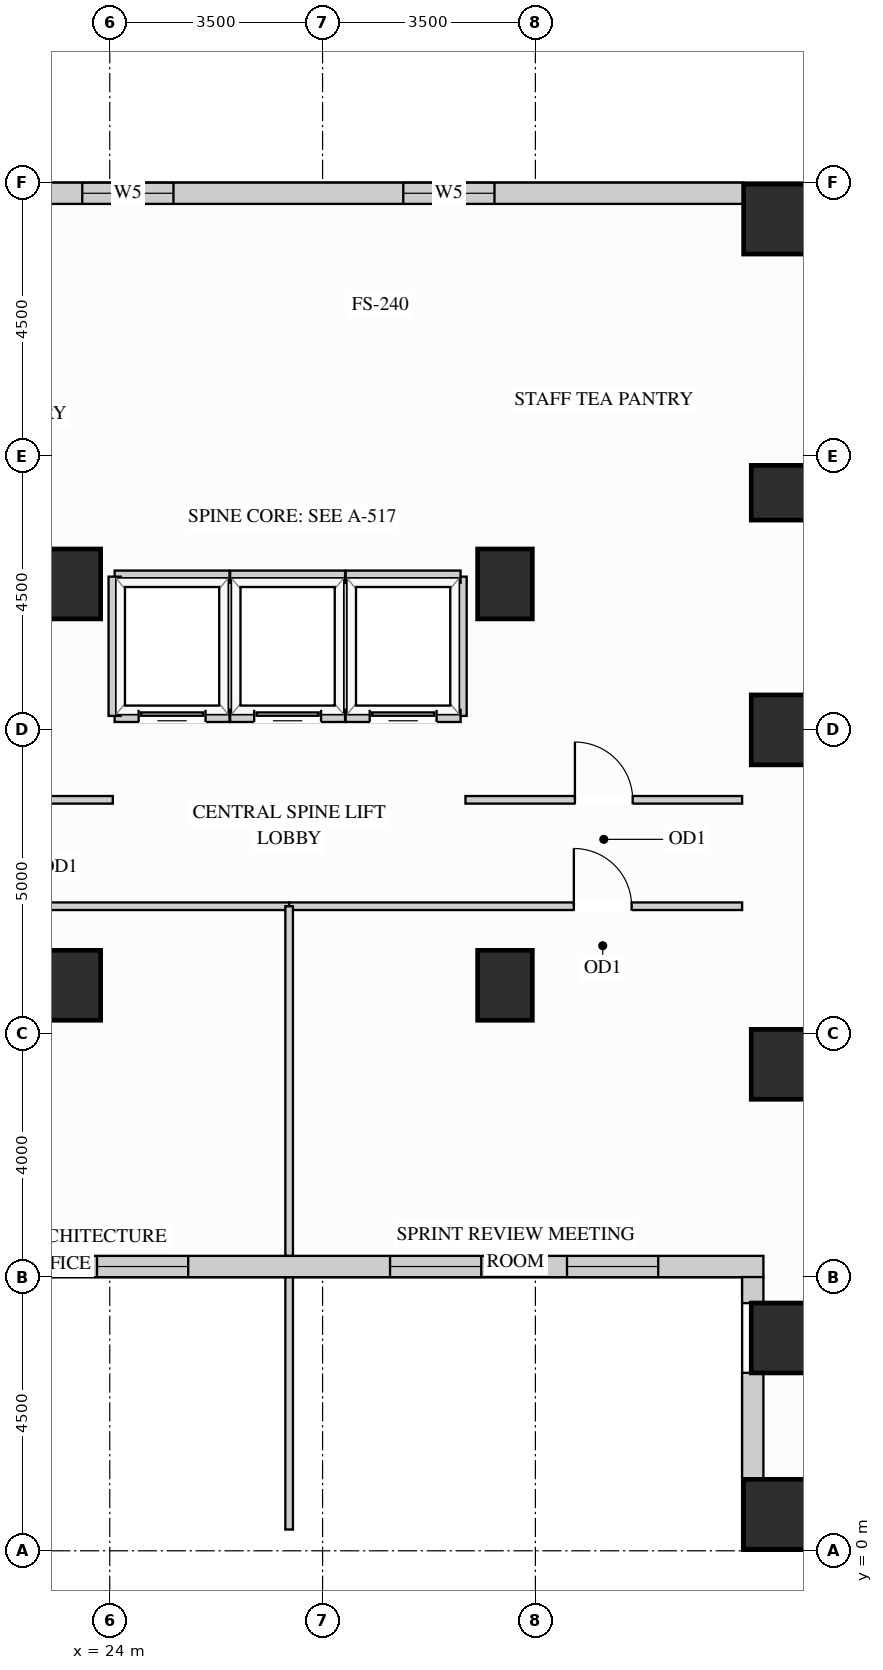
"""IFC4 building model, lengths in metres.
Left out: names, types, materials, properties, quantities, classifications, styles, units other than length and angle.
Written with IfcOpenShell. Run it as: python <this file> out.ifc"""

import sys

from ifc_helpers import new_model, si_unit, direction, frame, frame_2d, origin, origin_2d, place, context, subcontext, project, spatial, rectangle, extrude, source, transform, mapped, element, fill, save


model = new_model("IFC4")
c1 = context("Model", 3, precision=1e-05, world=origin(), true_north=direction((0.0, 1.0)))
c2 = subcontext(c1, "Body", "Model", "MODEL_VIEW")
j1 = project(units=[si_unit("LENGTHUNIT", "METRE"), si_unit("PLANEANGLEUNIT", "RADIAN")], contexts=[c1])
p1 = place(None, origin())
s1 = spatial("IfcSite", under=j1, at=p1, CompositionType="ELEMENT")
p2 = place(p1, origin())
s2 = spatial("IfcBuilding", under=s1, at=p2, CompositionType="ELEMENT")
p3 = place(p2, frame((0.0, 0.0, 77.4)))
s3 = spatial("IfcBuildingStorey", under=s2, at=p3, CompositionType="ELEMENT", Elevation=77.4)
m1 = source(origin(), c2, "Body", "SweptSolid", [
    extrude(rectangle(XDim=0.9, YDim=0.9, at=origin_2d()), origin(), (0.0, 0.0, 1.0), 3.38),
])
p4 = place(p3, frame((35.0, 17.4, 0.0), z_axis=(0.0, 0.0, 1.0), x_axis=(1.0, 0.0, 0.0)))
e1 = element("IfcColumn", 1, at=p4, inside=s3, PredefinedType="COLUMN", context=c2, shape_type="MappedRepresentation", body=[
    mapped(m1, transform((0.0, 0.0, 0.0), x_axis=(1.0, 0.0, 0.0), y_axis=(0.0, 1.0, 0.0), z_axis=(0.0, 0.0, 1.0))),
])
m2 = source(origin(), c2, "Body", "SweptSolid", [
    extrude(rectangle(XDim=0.9, YDim=1.15, at=origin_2d()), origin(), (0.0, 0.0, 1.0), 3.38),
])
for number, where, z_axis, x_axis in (
    (2, (35.0, 13.5, 0.0), (0.0, 0.0, 1.0), (1.0, 0.0, 0.0)),
    (3, (35.0, 3.5, 0.0), (0.0, 0.0, 1.0), (1.0, 0.0, 0.0)),
    (4, (35.0, 8.0, 0.0), (0.0, 0.0, 1.0), (1.0, 0.0, 0.0)),
    (5, (23.4, 15.9, 0.0), (0.0, 0.0, 1.0), (1.0, 0.0, 0.0)),
    (6, (23.4, 9.3, 0.0), (0.0, 0.0, 1.0), (1.0, 0.0, 0.0)),
    (7, (30.5, 15.9, 0.0), (0.0, 0.0, 1.0), (1.0, 0.0, 0.0)),
    (8, (30.5, 9.3, 0.0), (0.0, 0.0, 1.0), (1.0, 0.0, 0.0)),
):
    element("IfcColumn", number, at=place(p3, frame(where, z_axis=z_axis, x_axis=x_axis)), inside=s3, PredefinedType="COLUMN", context=c2, shape_type="MappedRepresentation", body=[
        mapped(m2, transform((0.0, 0.0, 0.0), x_axis=(1.0, 0.0, 0.0), y_axis=(0.0, 1.0, 0.0), z_axis=(0.0, 0.0, 1.0))),
    ])
m3 = source(origin(), c2, "Body", "SweptSolid", [
    extrude(rectangle(XDim=1.15, YDim=1.15, at=origin_2d()), origin(), (0.0, 0.0, 1.0), 3.38),
])
for number, where, z_axis, x_axis in (
    (9, (35.0, 21.9, 0.0), (0.0, 0.0, 1.0), (1.0, 0.0, 0.0)),
    (10, (35.0, 0.6, 0.0), (0.0, 0.0, 1.0), (1.0, 0.0, 0.0)),
):
    element("IfcColumn", number, at=place(p3, frame(where, z_axis=z_axis, x_axis=x_axis)), inside=s3, PredefinedType="COLUMN", context=c2, shape_type="MappedRepresentation", body=[
        mapped(m3, transform((0.0, 0.0, 0.0), x_axis=(1.0, 0.0, 0.0), y_axis=(0.0, 1.0, 0.0), z_axis=(0.0, 0.0, 1.0))),
    ])
p5 = place(p3, frame((19.15, 4.675, 0.0), z_axis=(0.0, 0.0, 1.0), x_axis=(1.0, 0.0, 0.0)))
e11 = element("IfcWall", 11, at=p5, inside=s3, PredefinedType="SOLIDWALL", context=c2, shape_type="SweptSolid", body=[
    extrude(rectangle(XDim=15.6, YDim=0.35, at=frame_2d((7.8, 0.0))), origin(), (0.0, 0.0, 1.0), 3.365),
])
p6 = place(p5, frame((1.73, 0.0, 0.78)))
e12 = element("IfcOpeningElement", 12, at=p6, cuts=e11, PredefinedType="OPENING", context=c2, shape_type="SweptSolid", body=[
    extrude(rectangle(XDim=1.5, YDim=2.0, at=frame_2d((0.75, 1.0))), frame((0.0, 0.185, 0.0), z_axis=(0.0, -1.0, 0.0), x_axis=(1.0, 0.0, 0.0)), (0.0, 0.0, 1.0), 0.37),
])
p7 = place(p5, frame((4.64, 0.0, 0.78)))
e13 = element("IfcOpeningElement", 13, at=p7, cuts=e11, PredefinedType="OPENING", context=c2, shape_type="SweptSolid", body=[
    extrude(rectangle(XDim=1.5, YDim=2.0, at=frame_2d((0.75, 1.0))), frame((0.0, 0.185, 0.0), z_axis=(0.0, -1.0, 0.0), x_axis=(1.0, 0.0, 0.0)), (0.0, 0.0, 1.0), 0.37),
])
p8 = place(p5, frame((9.46, 0.0, 0.78)))
e14 = element("IfcOpeningElement", 14, at=p8, cuts=e11, PredefinedType="OPENING", context=c2, shape_type="SweptSolid", body=[
    extrude(rectangle(XDim=1.5, YDim=2.0, at=frame_2d((0.75, 1.0))), frame((0.0, 0.185, 0.0), z_axis=(0.0, -1.0, 0.0), x_axis=(1.0, 0.0, 0.0)), (0.0, 0.0, 1.0), 0.37),
])
p9 = place(p5, frame((12.37, 0.0, 0.78)))
e15 = element("IfcOpeningElement", 15, at=p9, cuts=e11, PredefinedType="OPENING", context=c2, shape_type="SweptSolid", body=[
    extrude(rectangle(XDim=1.5, YDim=2.0, at=frame_2d((0.75, 1.0))), frame((0.0, 0.185, 0.0), z_axis=(0.0, -1.0, 0.0), x_axis=(1.0, 0.0, 0.0)), (0.0, 0.0, 1.0), 0.37),
])
m4 = source(origin(), c2, "Body", "SweptSolid", [
    extrude(rectangle(XDim=0.429, YDim=0.35, at=frame_2d((0.214, 0.0))), origin(), (0.0, 0.0, 1.0), 3.365),
])
p10 = place(p3, frame((34.575, 4.502, 0.0), z_axis=(0.0, 0.0, 1.0), x_axis=(0.0, -1.0, 0.0)))
e16 = element("IfcWall", 16, at=p10, inside=s3, PredefinedType="SOLIDWALL", context=c2, shape_type="MappedRepresentation", body=[
    mapped(m4, transform((0.0, 0.0, 0.0), x_axis=(1.0, 0.0, 0.0), y_axis=(0.0, 1.0, 0.0), z_axis=(0.0, 0.0, 1.0))),
])
m5 = source(origin(), c2, "Body", "SweptSolid", [
    extrude(rectangle(XDim=1.754, YDim=0.35, at=frame_2d((0.877, 0.0))), origin(), (0.0, 0.0, 1.0), 3.365),
])
p11 = place(p3, frame((34.575, 2.927, 0.0), z_axis=(0.0, 0.0, 1.0), x_axis=(0.0, -1.0, 0.0)))
e17 = element("IfcWall", 17, at=p11, inside=s3, PredefinedType="SOLIDWALL", context=c2, shape_type="MappedRepresentation", body=[
    mapped(m5, transform((0.0, 0.0, 0.0), x_axis=(1.0, 0.0, 0.0), y_axis=(0.0, 1.0, 0.0), z_axis=(0.0, 0.0, 1.0))),
])
p12 = place(p3, frame((34.427, 22.325, 0.0), z_axis=(0.0, 0.0, 1.0), x_axis=(-1.0, 0.0, 0.0)))
e18 = element("IfcWall", 18, at=p12, inside=s3, PredefinedType="SOLIDWALL", context=c2, shape_type="SweptSolid", body=[
    extrude(rectangle(XDim=14.979, YDim=0.35, at=frame_2d((7.49, 0.0))), origin(), (0.0, 0.0, 1.0), 3.365),
])
p13 = place(p12, frame((4.1, 0.0, 0.78)))
e19 = element("IfcOpeningElement", 19, at=p13, cuts=e18, PredefinedType="OPENING", context=c2, shape_type="SweptSolid", body=[
    extrude(rectangle(XDim=1.5, YDim=2.0, at=frame_2d((0.75, 1.0))), frame((0.0, 0.185, 0.0), z_axis=(0.0, -1.0, 0.0), x_axis=(1.0, 0.0, 0.0)), (0.0, 0.0, 1.0), 0.37),
])
p14 = place(p12, frame((9.379, 0.0, 0.78)))
e20 = element("IfcOpeningElement", 20, at=p14, cuts=e18, PredefinedType="OPENING", context=c2, shape_type="SweptSolid", body=[
    extrude(rectangle(XDim=1.5, YDim=2.0, at=frame_2d((0.75, 1.0))), frame((0.0, 0.185, 0.0), z_axis=(0.0, -1.0, 0.0), x_axis=(1.0, 0.0, 0.0)), (0.0, 0.0, 1.0), 0.37),
])
p15 = place(p3, frame((29.85, 12.35, 0.0), z_axis=(0.0, 0.0, 1.0), x_axis=(1.0, 0.0, 0.0)))
e21 = element("IfcWall", 21, at=p15, inside=s3, PredefinedType="PARTITIONING", context=c2, shape_type="SweptSolid", body=[
    extrude(rectangle(XDim=4.55, YDim=0.125, at=frame_2d((2.275, 0.0))), origin(), (0.0, 0.0, 1.0), 3.365),
])
p16 = place(p15, frame((1.8, 0.0, 0.0)))
e22 = element("IfcOpeningElement", 22, at=p16, cuts=e21, PredefinedType="OPENING", context=c2, shape_type="SweptSolid", body=[
    extrude(rectangle(XDim=0.95, YDim=2.15, at=frame_2d((0.475, 1.075))), frame((0.0, 0.073, 0.0), z_axis=(0.0, -1.0, 0.0), x_axis=(1.0, 0.0, 0.0)), (0.0, 0.0, 1.0), 0.145),
])
p17 = place(p3, frame((19.5, 12.35, 0.0), z_axis=(0.0, 0.0, 1.0), x_axis=(1.0, 0.0, 0.0)))
e23 = element("IfcWall", 23, at=p17, inside=s3, PredefinedType="PARTITIONING", context=c2, shape_type="SweptSolid", body=[
    extrude(rectangle(XDim=4.55, YDim=0.125, at=frame_2d((2.275, 0.0))), origin(), (0.0, 0.0, 1.0), 3.365),
])
p18 = place(p17, frame((1.8, 0.0, 0.0)))
e24 = element("IfcOpeningElement", 24, at=p18, cuts=e23, PredefinedType="OPENING", context=c2, shape_type="SweptSolid", body=[
    extrude(rectangle(XDim=0.95, YDim=2.15, at=frame_2d((0.475, 1.075))), frame((0.0, 0.073, 0.0), z_axis=(0.0, -1.0, 0.0), x_axis=(1.0, 0.0, 0.0)), (0.0, 0.0, 1.0), 0.145),
])
p19 = place(p3, frame((19.5, 10.6, 0.0), z_axis=(0.0, 0.0, 1.0), x_axis=(1.0, 0.0, 0.0)))
e25 = element("IfcWall", 25, at=p19, inside=s3, PredefinedType="PARTITIONING", context=c2, shape_type="SweptSolid", body=[
    extrude(rectangle(XDim=7.45, YDim=0.125, at=frame_2d((3.725, 0.0))), origin(), (0.0, 0.0, 1.0), 3.365),
])
p20 = place(p19, frame((1.817, 0.0, 0.0)))
e26 = element("IfcOpeningElement", 26, at=p20, cuts=e25, PredefinedType="OPENING", context=c2, shape_type="SweptSolid", body=[
    extrude(rectangle(XDim=0.95, YDim=2.15, at=frame_2d((0.475, 1.075))), frame((0.0, 0.073, 0.0), z_axis=(0.0, -1.0, 0.0), x_axis=(1.0, 0.0, 0.0)), (0.0, 0.0, 1.0), 0.145),
])
p21 = place(p3, frame((26.95, 10.6, 0.0), z_axis=(0.0, 0.0, 1.0), x_axis=(1.0, 0.0, 0.0)))
e27 = element("IfcWall", 27, at=p21, inside=s3, PredefinedType="PARTITIONING", context=c2, shape_type="SweptSolid", body=[
    extrude(rectangle(XDim=7.45, YDim=0.125, at=frame_2d((3.725, 0.0))), origin(), (0.0, 0.0, 1.0), 3.365),
])
p22 = place(p21, frame((4.683, 0.0, 0.0)))
e28 = element("IfcOpeningElement", 28, at=p22, cuts=e27, PredefinedType="OPENING", context=c2, shape_type="SweptSolid", body=[
    extrude(rectangle(XDim=0.95, YDim=2.15, at=frame_2d((0.475, 1.075))), frame((0.0, 0.073, 0.0), z_axis=(0.0, -1.0, 0.0), x_axis=(1.0, 0.0, 0.0)), (0.0, 0.0, 1.0), 0.145),
])
m6 = source(origin(), c2, "Body", "SweptSolid", [
    extrude(rectangle(XDim=4.148, YDim=0.125, at=frame_2d((2.074, 0.0))), origin(), (0.0, 0.0, 1.0), 3.365),
])
p23 = place(p3, frame((26.95, 0.35, 0.0), z_axis=(0.0, 0.0, 1.0), x_axis=(0.0, 1.0, 0.0)))
e29 = element("IfcWall", 29, at=p23, inside=s3, PredefinedType="PARTITIONING", context=c2, shape_type="MappedRepresentation", body=[
    mapped(m6, transform((0.0, 0.0, 0.0), x_axis=(1.0, 0.0, 0.0), y_axis=(0.0, 1.0, 0.0), z_axis=(0.0, 0.0, 1.0))),
])
m7 = source(origin(), c2, "Body", "SweptSolid", [
    extrude(rectangle(XDim=5.748, YDim=0.125, at=frame_2d((2.874, 0.0))), origin(), (0.0, 0.0, 1.0), 3.365),
])
p24 = place(p3, frame((26.95, 4.852, 0.0), z_axis=(0.0, 0.0, 1.0), x_axis=(0.0, 1.0, 0.0)))
e30 = element("IfcWall", 30, at=p24, inside=s3, PredefinedType="PARTITIONING", context=c2, shape_type="MappedRepresentation", body=[
    mapped(m7, transform((0.0, 0.0, 0.0), x_axis=(1.0, 0.0, 0.0), y_axis=(0.0, 1.0, 0.0), z_axis=(0.0, 0.0, 1.0))),
])
m8 = source(origin(), c2, "Body", "SweptSolid", [
    extrude(rectangle(XDim=2.29, YDim=0.2, at=frame_2d((1.145, 0.0))), origin(), (0.0, 0.0, 1.0), 3.365),
])
p25 = place(p3, frame((25.97, 13.73, 0.0), z_axis=(0.0, 0.0, 1.0), x_axis=(0.0, 1.0, 0.0)))
e31 = element("IfcWall", 31, at=p25, inside=s3, PredefinedType="PARTITIONING", context=c2, shape_type="MappedRepresentation", body=[
    mapped(m8, transform((0.0, 0.0, 0.0), x_axis=(1.0, 0.0, 0.0), y_axis=(0.0, 1.0, 0.0), z_axis=(0.0, 0.0, 1.0))),
])
m9 = source(origin(), c2, "Body", "SweptSolid", [
    extrude(rectangle(XDim=1.89, YDim=0.2, at=frame_2d((0.945, 0.0))), origin(), (0.0, 0.0, 1.0), 2.677),
])
p26 = place(p3, frame((24.08, 16.02, 0.0), z_axis=(0.0, 0.0, 1.0), x_axis=(1.0, 0.0, 0.0)))
e32 = element("IfcWall", 32, at=p26, inside=s3, PredefinedType="PARTITIONING", context=c2, shape_type="MappedRepresentation", body=[
    mapped(m9, transform((0.0, 0.0, 0.0), x_axis=(1.0, 0.0, 0.0), y_axis=(0.0, 1.0, 0.0), z_axis=(0.0, 0.0, 1.0))),
])
p27 = place(p3, frame((24.08, 13.73, 0.0), z_axis=(0.0, 0.0, 1.0), x_axis=(1.0, 0.0, 0.0)))
e33 = element("IfcWall", 33, at=p27, inside=s3, PredefinedType="PARTITIONING", context=c2, shape_type="SweptSolid", body=[
    extrude(rectangle(XDim=1.89, YDim=0.2, at=frame_2d((0.945, 0.0))), origin(), (0.0, 0.0, 1.0), 2.446),
])
p28 = place(p27, frame((0.395, 0.0, 0.0)))
e34 = element("IfcOpeningElement", 34, at=p28, cuts=e33, PredefinedType="OPENING", context=c2, shape_type="SweptSolid", body=[
    extrude(rectangle(XDim=1.1, YDim=2.2, at=frame_2d((0.55, 1.1))), frame((0.0, 0.11, 0.0), z_axis=(0.0, -1.0, 0.0), x_axis=(1.0, 0.0, 0.0)), (0.0, 0.0, 1.0), 0.22),
])
for number, where, z_axis, x_axis in (
    (35, (24.08, 13.73, 0.0), (0.0, 0.0, 1.0), (0.0, 1.0, 0.0)),
    (36, (27.87, 13.73, 0.0), (0.0, 0.0, 1.0), (0.0, 1.0, 0.0)),
):
    element("IfcWall", number, at=place(p3, frame(where, z_axis=z_axis, x_axis=x_axis)), inside=s3, PredefinedType="PARTITIONING", context=c2, shape_type="MappedRepresentation", body=[
        mapped(m8, transform((0.0, 0.0, 0.0), x_axis=(1.0, 0.0, 0.0), y_axis=(0.0, 1.0, 0.0), z_axis=(0.0, 0.0, 1.0))),
    ])
m10 = source(origin(), c2, "Body", "SweptSolid", [
    extrude(rectangle(XDim=1.89, YDim=0.2, at=frame_2d((0.945, 0.0))), origin(), (0.0, 0.0, 1.0), 2.677),
])
p29 = place(p3, frame((25.98, 16.02, 0.0), z_axis=(0.0, 0.0, 1.0), x_axis=(1.0, 0.0, 0.0)))
e37 = element("IfcWall", 37, at=p29, inside=s3, PredefinedType="PARTITIONING", context=c2, shape_type="MappedRepresentation", body=[
    mapped(m10, transform((0.0, 0.0, 0.0), x_axis=(1.0, 0.0, 0.0), y_axis=(0.0, 1.0, 0.0), z_axis=(0.0, 0.0, 1.0))),
])
p30 = place(p3, frame((25.98, 13.73, 0.0), z_axis=(0.0, 0.0, 1.0), x_axis=(1.0, 0.0, 0.0)))
e38 = element("IfcWall", 38, at=p30, inside=s3, PredefinedType="PARTITIONING", context=c2, shape_type="SweptSolid", body=[
    extrude(rectangle(XDim=1.89, YDim=0.2, at=frame_2d((0.945, 0.0))), origin(), (0.0, 0.0, 1.0), 2.446),
])
p31 = place(p30, frame((0.395, 0.0, 0.0)))
e39 = element("IfcOpeningElement", 39, at=p31, cuts=e38, PredefinedType="OPENING", context=c2, shape_type="SweptSolid", body=[
    extrude(rectangle(XDim=1.1, YDim=2.2, at=frame_2d((0.55, 1.1))), frame((0.0, 0.11, 0.0), z_axis=(0.0, -1.0, 0.0), x_axis=(1.0, 0.0, 0.0)), (0.0, 0.0, 1.0), 0.22),
])
p32 = place(p3, frame((29.77, 13.73, 0.0), z_axis=(0.0, 0.0, 1.0), x_axis=(0.0, 1.0, 0.0)))
e40 = element("IfcWall", 40, at=p32, inside=s3, PredefinedType="PARTITIONING", context=c2, shape_type="MappedRepresentation", body=[
    mapped(m8, transform((0.0, 0.0, 0.0), x_axis=(1.0, 0.0, 0.0), y_axis=(0.0, 1.0, 0.0), z_axis=(0.0, 0.0, 1.0))),
])
p33 = place(p3, frame((27.88, 16.02, 0.0), z_axis=(0.0, 0.0, 1.0), x_axis=(1.0, 0.0, 0.0)))
e41 = element("IfcWall", 41, at=p33, inside=s3, PredefinedType="PARTITIONING", context=c2, shape_type="MappedRepresentation", body=[
    mapped(m10, transform((0.0, 0.0, 0.0), x_axis=(1.0, 0.0, 0.0), y_axis=(0.0, 1.0, 0.0), z_axis=(0.0, 0.0, 1.0))),
])
p34 = place(p3, frame((27.88, 13.73, 0.0), z_axis=(0.0, 0.0, 1.0), x_axis=(1.0, 0.0, 0.0)))
e42 = element("IfcWall", 42, at=p34, inside=s3, PredefinedType="PARTITIONING", context=c2, shape_type="SweptSolid", body=[
    extrude(rectangle(XDim=1.89, YDim=0.2, at=frame_2d((0.945, 0.0))), origin(), (0.0, 0.0, 1.0), 2.446),
])
p35 = place(p34, frame((0.395, 0.0, 0.0)))
e43 = element("IfcOpeningElement", 43, at=p35, cuts=e42, PredefinedType="OPENING", context=c2, shape_type="SweptSolid", body=[
    extrude(rectangle(XDim=1.1, YDim=2.2, at=frame_2d((0.55, 1.1))), frame((0.0, 0.11, 0.0), z_axis=(0.0, -1.0, 0.0), x_axis=(1.0, 0.0, 0.0)), (0.0, 0.0, 1.0), 0.22),
])
m11 = source(origin(), c2, "Body", "SweptSolid", [
    extrude(rectangle(XDim=1.1, YDim=2.2, at=frame_2d((0.55, 1.1))), frame((0.0, 0.025, 0.0), z_axis=(0.0, -1.0, 0.0), x_axis=(1.0, 0.0, 0.0)), (0.0, 0.0, 1.0), 0.05),
])
p36 = place(p28, origin())
e44 = element("IfcDoor", 44, at=p36, inside=s3, OperationType="SLIDING_TO_LEFT", PredefinedType="DOOR", context=c2, shape_type="MappedRepresentation", body=[
    mapped(m11, transform((0.0, 0.0, 0.0), x_axis=(1.0, 0.0, 0.0), y_axis=(0.0, 1.0, 0.0), z_axis=(0.0, 0.0, 1.0))),
])
fill(e34, e44)
p37 = place(p31, origin())
e45 = element("IfcDoor", 45, at=p37, inside=s3, OperationType="SLIDING_TO_LEFT", PredefinedType="DOOR", context=c2, shape_type="MappedRepresentation", body=[
    mapped(m11, transform((0.0, 0.0, 0.0), x_axis=(1.0, 0.0, 0.0), y_axis=(0.0, 1.0, 0.0), z_axis=(0.0, 0.0, 1.0))),
])
fill(e39, e45)
p38 = place(p35, origin())
e46 = element("IfcDoor", 46, at=p38, inside=s3, OperationType="SLIDING_TO_LEFT", PredefinedType="DOOR", context=c2, shape_type="MappedRepresentation", body=[
    mapped(m11, transform((0.0, 0.0, 0.0), x_axis=(1.0, 0.0, 0.0), y_axis=(0.0, 1.0, 0.0), z_axis=(0.0, 0.0, 1.0))),
])
fill(e43, e46)
m12 = source(origin(), c2, "Body", "SweptSolid", [
    extrude(rectangle(XDim=0.95, YDim=2.15, at=frame_2d((0.475, 1.075))), frame((0.0, 0.025, 0.0), z_axis=(0.0, -1.0, 0.0), x_axis=(1.0, 0.0, 0.0)), (0.0, 0.0, 1.0), 0.05),
])
p39 = place(p16, origin())
e47 = element("IfcDoor", 47, at=p39, inside=s3, OperationType="SINGLE_SWING_LEFT", PredefinedType="DOOR", context=c2, shape_type="MappedRepresentation", body=[
    mapped(m12, transform((0.0, 0.0, 0.0), x_axis=(1.0, 0.0, 0.0), y_axis=(0.0, 1.0, 0.0), z_axis=(0.0, 0.0, 1.0))),
])
fill(e22, e47)
p40 = place(p22, origin())
e48 = element("IfcDoor", 48, at=p40, inside=s3, OperationType="SINGLE_SWING_LEFT", PredefinedType="DOOR", context=c2, shape_type="MappedRepresentation", body=[
    mapped(m12, transform((0.0, 0.0, 0.0), x_axis=(1.0, 0.0, 0.0), y_axis=(0.0, 1.0, 0.0), z_axis=(0.0, 0.0, 1.0))),
])
fill(e28, e48)
m13 = source(origin(), c2, "Body", "SweptSolid", [
    extrude(rectangle(XDim=1.5, YDim=2.0, at=frame_2d((0.75, 1.0))), frame((0.0, 0.03, 0.0), z_axis=(0.0, -1.0, 0.0), x_axis=(1.0, 0.0, 0.0)), (0.0, 0.0, 1.0), 0.06),
])
p41 = place(p7, origin())
e49 = element("IfcWindow", 49, at=p41, inside=s3, PartitioningType="SINGLE_PANEL", PredefinedType="WINDOW", context=c2, shape_type="MappedRepresentation", body=[
    mapped(m13, transform((0.0, 0.0, 0.0), x_axis=(1.0, 0.0, 0.0), y_axis=(0.0, 1.0, 0.0), z_axis=(0.0, 0.0, 1.0))),
])
fill(e13, e49)
p42 = place(p8, origin())
e50 = element("IfcWindow", 50, at=p42, inside=s3, PartitioningType="SINGLE_PANEL", PredefinedType="WINDOW", context=c2, shape_type="MappedRepresentation", body=[
    mapped(m13, transform((0.0, 0.0, 0.0), x_axis=(1.0, 0.0, 0.0), y_axis=(0.0, 1.0, 0.0), z_axis=(0.0, 0.0, 1.0))),
])
fill(e14, e50)
p43 = place(p9, origin())
e51 = element("IfcWindow", 51, at=p43, inside=s3, PartitioningType="SINGLE_PANEL", PredefinedType="WINDOW", context=c2, shape_type="MappedRepresentation", body=[
    mapped(m13, transform((0.0, 0.0, 0.0), x_axis=(1.0, 0.0, 0.0), y_axis=(0.0, 1.0, 0.0), z_axis=(0.0, 0.0, 1.0))),
])
fill(e15, e51)
p44 = place(p13, origin())
e52 = element("IfcWindow", 52, at=p44, inside=s3, PartitioningType="SINGLE_PANEL", PredefinedType="WINDOW", context=c2, shape_type="MappedRepresentation", body=[
    mapped(m13, transform((0.0, 0.0, 0.0), x_axis=(1.0, 0.0, 0.0), y_axis=(0.0, 1.0, 0.0), z_axis=(0.0, 0.0, 1.0))),
])
fill(e19, e52)
p45 = place(p14, origin())
e53 = element("IfcWindow", 53, at=p45, inside=s3, PartitioningType="SINGLE_PANEL", PredefinedType="WINDOW", context=c2, shape_type="MappedRepresentation", body=[
    mapped(m13, transform((0.0, 0.0, 0.0), x_axis=(1.0, 0.0, 0.0), y_axis=(0.0, 1.0, 0.0), z_axis=(0.0, 0.0, 1.0))),
])
fill(e20, e53)
save(model, sys.argv[1])
